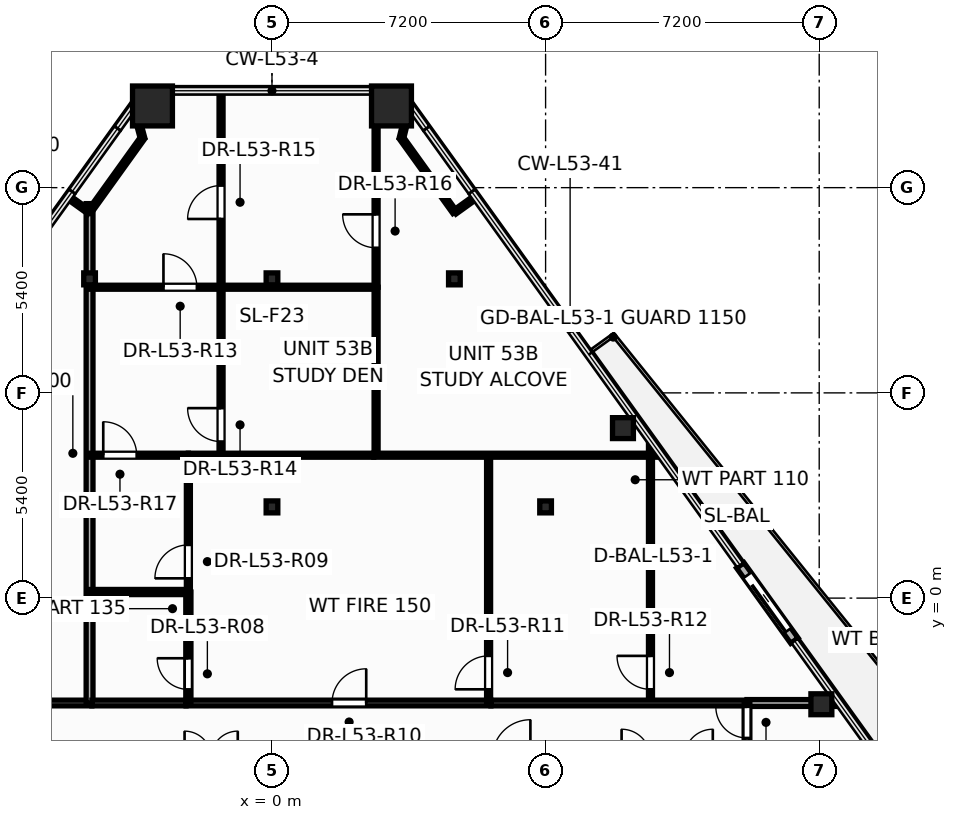
"""IFC4 building model, lengths in metres.
Left out: names, types, materials, properties, quantities, classifications, styles, units other than length and angle.
Written with IfcOpenShell. Run it as: python <this file> out.ifc"""

import sys

from ifc_helpers import new_model, si_unit, direction, frame, frame_2d, origin, origin_2d, place, context, subcontext, project, spatial, rectangle, hollow_rectangle, hollow_circle, i_section, extrude, element, fill, save


model = new_model("IFC4")
c1 = context("Model", 3, precision=1e-05, world=origin(), true_north=direction((0.0, 1.0)))
c2 = subcontext(c1, "Body", "Model", "MODEL_VIEW")
j1 = project(units=[si_unit("LENGTHUNIT", "METRE"), si_unit("PLANEANGLEUNIT", "RADIAN")], contexts=[c1])
p1 = place(None, origin())
s1 = spatial("IfcSite", under=j1, at=p1, CompositionType="ELEMENT")
p2 = place(p1, origin())
s2 = spatial("IfcBuilding", under=s1, at=p2, CompositionType="ELEMENT")
p3 = place(p2, frame((0.0, 0.0, 203.7)))
s3 = spatial("IfcBuildingStorey", under=s2, at=p3, CompositionType="ELEMENT", Elevation=203.7)
for number, where, z_axis, x_axis in (
    (1, (3.145, 12.95, 0.0), (0.0, 0.0, 1.0), (1.0, 0.0, 0.0)),
    (2, (-3.145, 12.95, 0.0), (0.0, 0.0, 1.0), (1.0, 0.0, 0.0)),
):
    element("IfcColumn", number, at=place(p3, frame(where, z_axis=z_axis, x_axis=x_axis)), inside=s3, PredefinedType="COLUMN", context=c2, shape_type="SweptSolid", body=[
        extrude(hollow_rectangle(XDim=1.05, YDim=1.05, WallThickness=0.045, at=origin_2d()), origin(), (0.0, 0.0, 1.0), 3.6),
    ])
for number, where, z_axis, x_axis in (
    (3, (14.457, -2.793, 0.0), (0.0, 0.0, 1.0), (1.0, 0.0, 0.0)),
    (4, (9.236, 4.473, 0.0), (0.0, 0.0, 1.0), (1.0, 0.0, 0.0)),
):
    element("IfcColumn", number, at=place(p3, frame(where, z_axis=z_axis, x_axis=x_axis)), inside=s3, PredefinedType="COLUMN", context=c2, shape_type="SweptSolid", body=[
        extrude(hollow_circle(Radius=0.275, WallThickness=0.024, at=origin_2d()), origin(), (0.0, 0.0, 1.0), 3.6),
    ])
for number, where, z_axis, x_axis in (
    (5, (0.0, 2.4, 0.0), (0.0, 0.0, 1.0), (1.0, 0.0, 0.0)),
    (6, (7.2, 2.4, 0.0), (0.0, 0.0, 1.0), (1.0, 0.0, 0.0)),
    (7, (-4.8, 8.4, 0.0), (0.0, 0.0, 1.0), (1.0, 0.0, 0.0)),
    (8, (0.0, 8.4, 0.0), (0.0, 0.0, 1.0), (1.0, 0.0, 0.0)),
    (9, (4.8, 8.4, 0.0), (0.0, 0.0, 1.0), (1.0, 0.0, 0.0)),
):
    element("IfcColumn", number, at=place(p3, frame(where, z_axis=z_axis, x_axis=x_axis)), inside=s3, PredefinedType="COLUMN", context=c2, shape_type="SweptSolid", body=[
        extrude(i_section(OverallWidth=0.307, OverallDepth=0.314, WebThickness=0.012, FlangeThickness=0.019, at=origin_2d()), origin(), (0.0, 0.0, 1.0), 3.6),
    ])
p4 = place(p3, frame((13.747, -1.12, -0.015), z_axis=(0.0, 0.0, 1.0), x_axis=(-0.58349791381, 0.812114637585, 0.0)))
e10 = element("IfcWall", 10, at=p4, inside=s3, PredefinedType="STANDARD", context=c2, shape_type="SweptSolid", body=[
    extrude(rectangle(XDim=2.44, YDim=0.24, at=frame_2d((1.22, 0.0))), origin(), (0.0, 0.0, 1.0), 2.802),
])
p5 = place(p4, frame((0.32, 0.0, 0.015)))
e11 = element("IfcOpeningElement", 11, at=p5, cuts=e10, PredefinedType="OPENING", context=c2, shape_type="SweptSolid", body=[
    extrude(rectangle(XDim=1.806, YDim=2.204, at=frame_2d((0.9, 1.102))), frame((0.0, 0.13, 0.0), z_axis=(0.0, -1.0, 0.0), x_axis=(1.0, 0.0, 0.0)), (0.0, 0.0, 1.0), 0.26),
])
p6 = place(p3, frame((-2.26, -2.76, 0.0), z_axis=(0.0, 0.0, 1.0), x_axis=(1.0, 0.0, 0.0)))
e12 = element("IfcWall", 12, at=p6, inside=s3, PredefinedType="PARTITIONING", context=c2, shape_type="SweptSolid", body=[
    extrude(rectangle(XDim=8.02, YDim=0.15, at=frame_2d((4.01, 0.0))), origin(), (0.0, 0.0, 1.0), 2.32),
])
p7 = place(p6, frame((3.84, 0.0, 0.0)))
e13 = element("IfcOpeningElement", 13, at=p7, cuts=e12, PredefinedType="OPENING", context=c2, shape_type="SweptSolid", body=[
    extrude(rectangle(XDim=0.906, YDim=2.104, at=frame_2d((0.45, 1.052))), frame((0.0, 0.085, 0.0), z_axis=(0.0, -1.0, 0.0), x_axis=(1.0, 0.0, 0.0)), (0.0, 0.0, 1.0), 0.17),
])
p8 = place(p3, frame((-12.5, -2.76, 0.0), z_axis=(0.0, 0.0, 1.0), x_axis=(1.0, 0.0, 0.0)))
e14 = element("IfcWall", 14, at=p8, inside=s3, PredefinedType="PARTITIONING", context=c2, shape_type="SweptSolid", body=[
    extrude(rectangle(XDim=7.76, YDim=0.15, at=frame_2d((3.88, 0.0))), origin(), (0.0, 0.0, 1.0), 2.32),
])
p9 = place(p8, frame((1.675, 0.0, 0.0)))
e15 = element("IfcOpeningElement", 15, at=p9, cuts=e14, PredefinedType="OPENING", context=c2, shape_type="SweptSolid", body=[
    extrude(rectangle(XDim=0.906, YDim=2.104, at=frame_2d((0.45, 1.052))), frame((0.0, 0.085, 0.0), z_axis=(0.0, -1.0, 0.0), x_axis=(1.0, 0.0, 0.0)), (0.0, 0.0, 1.0), 0.17),
])
p10 = place(p3, frame((9.96, -2.76, 0.0), z_axis=(0.0, 0.0, 1.0), x_axis=(0.0, 1.0, 0.0)))
e16 = element("IfcWall", 16, at=p10, inside=s3, PredefinedType="PARTITIONING", context=c2, shape_type="SweptSolid", body=[
    extrude(rectangle(XDim=6.911, YDim=0.105, at=frame_2d((3.455, 0.0))), origin(), (0.0, 0.0, 1.0), 2.62),
])
p11 = place(p10, frame((0.36, 0.0, 0.0)))
e17 = element("IfcOpeningElement", 17, at=p11, cuts=e16, PredefinedType="OPENING", context=c2, shape_type="SweptSolid", body=[
    extrude(rectangle(XDim=0.886, YDim=2.104, at=frame_2d((0.44, 1.052))), frame((0.0, 0.062, 0.0), z_axis=(0.0, -1.0, 0.0), x_axis=(1.0, 0.0, 0.0)), (0.0, 0.0, 1.0), 0.125),
])
p12 = place(p3, frame((5.7, -2.76, 0.0), z_axis=(0.0, 0.0, 1.0), x_axis=(0.0, 1.0, 0.0)))
e18 = element("IfcWall", 18, at=p12, inside=s3, PredefinedType="PARTITIONING", context=c2, shape_type="SweptSolid", body=[
    extrude(rectangle(XDim=6.52, YDim=0.105, at=frame_2d((3.26, 0.0))), origin(), (0.0, 0.0, 1.0), 2.32),
])
p13 = place(p12, frame((0.36, 0.0, 0.0)))
e19 = element("IfcOpeningElement", 19, at=p13, cuts=e18, PredefinedType="OPENING", context=c2, shape_type="SweptSolid", body=[
    extrude(rectangle(XDim=0.886, YDim=2.104, at=frame_2d((0.44, 1.052))), frame((0.0, 0.062, 0.0), z_axis=(0.0, -1.0, 0.0), x_axis=(1.0, 0.0, 0.0)), (0.0, 0.0, 1.0), 0.125),
])
p14 = place(p3, frame((-1.34, 8.18, 0.0), z_axis=(0.0, 0.0, 1.0), x_axis=(0.0, 1.0, 0.0)))
e20 = element("IfcWall", 20, at=p14, inside=s3, PredefinedType="PARTITIONING", context=c2, shape_type="SweptSolid", body=[
    extrude(rectangle(XDim=5.17, YDim=0.105, at=frame_2d((2.585, 0.0))), origin(), (0.0, 0.0, 1.0), 2.62),
])
p15 = place(p14, frame((1.796, 0.0, 0.0)))
e21 = element("IfcOpeningElement", 21, at=p15, cuts=e20, PredefinedType="OPENING", context=c2, shape_type="SweptSolid", body=[
    extrude(rectangle(XDim=0.886, YDim=2.104, at=frame_2d((0.44, 1.052))), frame((0.0, 0.062, 0.0), z_axis=(0.0, -1.0, 0.0), x_axis=(1.0, 0.0, 0.0)), (0.0, 0.0, 1.0), 0.125),
])
p16 = place(p3, frame((2.74, 8.18, 0.0), z_axis=(0.0, 0.0, 1.0), x_axis=(0.0, 1.0, 0.0)))
e22 = element("IfcWall", 22, at=p16, inside=s3, PredefinedType="PARTITIONING", context=c2, shape_type="SweptSolid", body=[
    extrude(rectangle(XDim=5.17, YDim=0.105, at=frame_2d((2.585, 0.0))), origin(), (0.0, 0.0, 1.0), 2.62),
])
p17 = place(p16, frame((1.038, 0.0, 0.0)))
e23 = element("IfcOpeningElement", 23, at=p17, cuts=e22, PredefinedType="OPENING", context=c2, shape_type="SweptSolid", body=[
    extrude(rectangle(XDim=0.886, YDim=2.104, at=frame_2d((0.44, 1.052))), frame((0.0, 0.062, 0.0), z_axis=(0.0, -1.0, 0.0), x_axis=(1.0, 0.0, 0.0)), (0.0, 0.0, 1.0), 0.125),
])
p18 = place(p3, frame((-4.8, -2.76, 0.0), z_axis=(0.0, 0.0, 1.0), x_axis=(0.0, 1.0, 0.0)))
e24 = element("IfcWall", 24, at=p18, inside=s3, PredefinedType="PARTITIONING", context=c2, shape_type="SweptSolid", body=[
    extrude(rectangle(XDim=13.14, YDim=0.18, at=frame_2d((6.57, 0.0))), origin(), (0.0, 0.0, 1.0), 2.32),
])
p19 = place(p3, frame((2.68, 3.76, 0.0), z_axis=(0.0, 0.0, 1.0), x_axis=(1.0, 0.0, 0.0)))
e25 = element("IfcWall", 25, at=p19, inside=s3, PredefinedType="PARTITIONING", context=c2, shape_type="SweptSolid", body=[
    extrude(rectangle(XDim=7.561, YDim=0.105, at=frame_2d((3.78, 0.0))), origin(), (0.0, 0.0, 1.0), 2.62),
])
p20 = place(p3, frame((-1.34, 3.76, 0.0), z_axis=(0.0, 0.0, 1.0), x_axis=(0.0, 1.0, 0.0)))
e26 = element("IfcWall", 26, at=p20, inside=s3, PredefinedType="PARTITIONING", context=c2, shape_type="SweptSolid", body=[
    extrude(rectangle(XDim=4.42, YDim=0.105, at=frame_2d((2.21, 0.0))), origin(), (0.0, 0.0, 1.0), 3.345),
])
p21 = place(p20, frame((0.359, 0.0, 0.0)))
e27 = element("IfcOpeningElement", 27, at=p21, cuts=e26, PredefinedType="OPENING", context=c2, shape_type="SweptSolid", body=[
    extrude(rectangle(XDim=0.886, YDim=2.104, at=frame_2d((0.44, 1.052))), frame((0.0, 0.062, 0.0), z_axis=(0.0, -1.0, 0.0), x_axis=(1.0, 0.0, 0.0)), (0.0, 0.0, 1.0), 0.125),
])
p22 = place(p3, frame((2.74, 3.76, 0.0), z_axis=(0.0, 0.0, 1.0), x_axis=(0.0, 1.0, 0.0)))
e28 = element("IfcWall", 28, at=p22, inside=s3, PredefinedType="PARTITIONING", context=c2, shape_type="SweptSolid", body=[
    extrude(rectangle(XDim=4.42, YDim=0.105, at=frame_2d((2.21, 0.0))), origin(), (0.0, 0.0, 1.0), 3.345),
])
p23 = place(p3, frame((5.762, -2.76, 0.0), z_axis=(0.0, 0.0, 1.0), x_axis=(1.0, 0.0, 0.0)))
e29 = element("IfcWall", 29, at=p23, inside=s3, PredefinedType="PARTITIONING", context=c2, shape_type="SweptSolid", body=[
    extrude(rectangle(XDim=6.738, YDim=0.15, at=frame_2d((3.369, 0.0))), origin(), (0.0, 0.0, 1.0), 2.32),
])
p24 = place(p3, frame((-2.2, 3.76, 0.0), z_axis=(0.0, 0.0, 1.0), x_axis=(1.0, 0.0, 0.0)))
e30 = element("IfcWall", 30, at=p24, inside=s3, PredefinedType="PARTITIONING", context=c2, shape_type="SweptSolid", body=[
    extrude(rectangle(XDim=4.878, YDim=0.105, at=frame_2d((2.439, 0.0))), origin(), (0.0, 0.0, 1.0), 2.32),
])
p25 = place(p3, frame((-1.34, 8.18, 0.0), z_axis=(0.0, 0.0, 1.0), x_axis=(1.0, 0.0, 0.0)))
e31 = element("IfcWall", 31, at=p25, inside=s3, PredefinedType="PARTITIONING", context=c2, shape_type="SweptSolid", body=[
    extrude(rectangle(XDim=4.08, YDim=0.105, at=frame_2d((2.04, 0.0))), origin(), (0.0, 0.0, 1.0), 2.32),
])
p26 = place(p3, frame((-2.2, 0.16, 0.0), z_axis=(0.0, 0.0, 1.0), x_axis=(0.0, 1.0, 0.0)))
e32 = element("IfcWall", 32, at=p26, inside=s3, PredefinedType="PARTITIONING", context=c2, shape_type="SweptSolid", body=[
    extrude(rectangle(XDim=3.6, YDim=0.105, at=frame_2d((1.8, 0.0))), origin(), (0.0, 0.0, 1.0), 2.32),
])
p27 = place(p26, frame((0.36, 0.0, 0.0)))
e33 = element("IfcOpeningElement", 33, at=p27, cuts=e32, PredefinedType="OPENING", context=c2, shape_type="SweptSolid", body=[
    extrude(rectangle(XDim=0.886, YDim=2.104, at=frame_2d((0.44, 1.052))), frame((0.0, 0.062, 0.0), z_axis=(0.0, -1.0, 0.0), x_axis=(1.0, 0.0, 0.0)), (0.0, 0.0, 1.0), 0.125),
])
p28 = place(p3, frame((-4.8, 8.18, 0.0), z_axis=(0.0, 0.0, 1.0), x_axis=(1.0, 0.0, 0.0)))
e34 = element("IfcWall", 34, at=p28, inside=s3, PredefinedType="PARTITIONING", context=c2, shape_type="SweptSolid", body=[
    extrude(rectangle(XDim=3.46, YDim=0.105, at=frame_2d((1.73, 0.0))), origin(), (0.0, 0.0, 1.0), 2.62),
])
p29 = place(p28, frame((1.944, 0.0, 0.0)))
e35 = element("IfcOpeningElement", 35, at=p29, cuts=e34, PredefinedType="OPENING", context=c2, shape_type="SweptSolid", body=[
    extrude(rectangle(XDim=0.886, YDim=2.104, at=frame_2d((0.44, 1.052))), frame((0.0, 0.062, 0.0), z_axis=(0.0, -1.0, 0.0), x_axis=(1.0, 0.0, 0.0)), (0.0, 0.0, 1.0), 0.125),
])
p30 = place(p3, frame((-2.2, -2.76, 0.0), z_axis=(0.0, 0.0, 1.0), x_axis=(0.0, 1.0, 0.0)))
e36 = element("IfcWall", 36, at=p30, inside=s3, PredefinedType="PARTITIONING", context=c2, shape_type="SweptSolid", body=[
    extrude(rectangle(XDim=2.92, YDim=0.135, at=frame_2d((1.46, 0.0))), origin(), (0.0, 0.0, 1.0), 3.345),
])
p31 = place(p30, frame((0.357, 0.0, 0.0)))
e37 = element("IfcOpeningElement", 37, at=p31, cuts=e36, PredefinedType="OPENING", context=c2, shape_type="SweptSolid", body=[
    extrude(rectangle(XDim=0.826, YDim=2.104, at=frame_2d((0.41, 1.052))), frame((0.0, 0.078, 0.0), z_axis=(0.0, -1.0, 0.0), x_axis=(1.0, 0.0, 0.0)), (0.0, 0.0, 1.0), 0.155),
])
p32 = place(p3, frame((-4.738, -2.76, 0.0), z_axis=(0.0, 0.0, 1.0), x_axis=(1.0, 0.0, 0.0)))
e38 = element("IfcWall", 38, at=p32, inside=s3, PredefinedType="PARTITIONING", context=c2, shape_type="SweptSolid", body=[
    extrude(rectangle(XDim=2.476, YDim=0.15, at=frame_2d((1.238, 0.0))), origin(), (0.0, 0.0, 1.0), 2.964),
])
p33 = place(p3, frame((-4.8, 0.16, 0.0), z_axis=(0.0, 0.0, 1.0), x_axis=(1.0, 0.0, 0.0)))
e39 = element("IfcWall", 39, at=p33, inside=s3, PredefinedType="PARTITIONING", context=c2, shape_type="SweptSolid", body=[
    extrude(rectangle(XDim=2.6, YDim=0.135, at=frame_2d((1.3, 0.0))), origin(), (0.0, 0.0, 1.0), 2.964),
])
p34 = place(p3, frame((-4.8, 3.76, 0.0), z_axis=(0.0, 0.0, 1.0), x_axis=(1.0, 0.0, 0.0)))
e40 = element("IfcWall", 40, at=p34, inside=s3, PredefinedType="PARTITIONING", context=c2, shape_type="SweptSolid", body=[
    extrude(rectangle(XDim=2.6, YDim=0.105, at=frame_2d((1.3, 0.0))), origin(), (0.0, 0.0, 1.0), 2.964),
])
p35 = place(p34, frame((0.36, 0.0, 0.0)))
e41 = element("IfcOpeningElement", 41, at=p35, cuts=e40, PredefinedType="OPENING", context=c2, shape_type="SweptSolid", body=[
    extrude(rectangle(XDim=0.886, YDim=2.104, at=frame_2d((0.44, 1.052))), frame((0.0, 0.062, 0.0), z_axis=(0.0, -1.0, 0.0), x_axis=(1.0, 0.0, 0.0)), (0.0, 0.0, 1.0), 0.125),
])
p36 = place(p3, frame((12.5, -2.76, 0.0), z_axis=(0.0, 0.0, 1.0), x_axis=(1.0, 0.0, 0.0)))
e42 = element("IfcWall", 42, at=p36, inside=s3, PredefinedType="PARTITIONING", context=c2, shape_type="SweptSolid", body=[
    extrude(rectangle(XDim=2.426, YDim=0.18, at=frame_2d((1.213, 0.0))), origin(), (0.0, 0.0, 1.0), 2.62),
])
for number, where, z_axis, x_axis in (
    (43, (-3.407, 12.104, 0.0), (0.0, 0.0, 1.0), (-0.584, -0.812, 0.0)),
    (44, (4.808, 10.155, 0.0), (0.0, 0.0, 1.0), (-0.584, 0.812, 0.0)),
):
    element("IfcWall", number, at=place(p3, frame(where, z_axis=z_axis, x_axis=x_axis)), inside=s3, PredefinedType="PARTITIONING", context=c2, shape_type="SweptSolid", body=[
        extrude(rectangle(XDim=2.4, YDim=0.12, at=frame_2d((1.2, 0.0))), origin(), (0.0, 0.0, 1.0), 2.62),
    ])
p37 = place(p3, frame((12.5, -4.24, 0.0), z_axis=(0.0, 0.0, 1.0), x_axis=(0.0, 1.0, 0.0)))
e45 = element("IfcWall", 45, at=p37, inside=s3, PredefinedType="PARTITIONING", context=c2, shape_type="SweptSolid", body=[
    extrude(rectangle(XDim=1.48, YDim=0.15, at=frame_2d((0.74, 0.0))), origin(), (0.0, 0.0, 1.0), 2.32),
])
p38 = place(p37, frame((0.56, 0.0, 0.0)))
e46 = element("IfcOpeningElement", 46, at=p38, cuts=e45, PredefinedType="OPENING", context=c2, shape_type="SweptSolid", body=[
    extrude(rectangle(XDim=0.826, YDim=2.104, at=frame_2d((0.41, 1.052))), frame((0.0, 0.085, 0.0), z_axis=(0.0, -1.0, 0.0), x_axis=(1.0, 0.0, 0.0)), (0.0, 0.0, 1.0), 0.17),
])
p39 = place(p3, frame((-3.63, 12.942, 0.0), z_axis=(0.0, 0.0, 1.0), x_axis=(0.256751374208, -0.966477486464, 0.0)))
e47 = element("IfcWall", 47, at=p39, inside=s3, PredefinedType="PARTITIONING", context=c2, shape_type="SweptSolid", body=[
    extrude(rectangle(XDim=0.867, YDim=0.12, at=frame_2d((0.434, 0.0))), origin(), (0.0, 0.0, 1.0), 2.62),
])
p40 = place(p3, frame((3.407, 12.104, 0.0), z_axis=(0.0, 0.0, 1.0), x_axis=(0.237718936872, 0.971333983269, 0.0)))
e48 = element("IfcWall", 48, at=p40, inside=s3, PredefinedType="PARTITIONING", context=c2, shape_type="SweptSolid", body=[
    extrude(rectangle(XDim=0.847, YDim=0.12, at=frame_2d((0.424, 0.0))), origin(), (0.0, 0.0, 1.0), 2.62),
])
for number, where, z_axis, x_axis in (
    (49, (-4.808, 10.155, 0.0), (0.0, 0.0, 1.0), (-0.812, 0.584, 0.0)),
    (50, (5.352, 10.546, 0.0), (0.0, 0.0, 1.0), (-0.812, -0.584, 0.0)),
):
    element("IfcWall", number, at=place(p3, frame(where, z_axis=z_axis, x_axis=x_axis)), inside=s3, PredefinedType="PARTITIONING", context=c2, shape_type="SweptSolid", body=[
        extrude(rectangle(XDim=0.67, YDim=0.12, at=frame_2d((0.335, 0.0))), origin(), (0.0, 0.0, 1.0), 2.787),
    ])
p41 = place(p5, origin())
e51 = element("IfcDoor", 51, at=p41, inside=s3, OperationType="SLIDING_TO_LEFT", PredefinedType="DOOR", context=c2, shape_type="SweptSolid", body=[
    extrude(rectangle(XDim=1.8, YDim=2.2, at=frame_2d((0.9, 1.1))), frame((0.0, 0.025, 0.0), z_axis=(0.0, -1.0, 0.0), x_axis=(1.0, 0.0, 0.0)), (0.0, 0.0, 1.0), 0.05),
])
fill(e11, e51)
p42 = place(p38, origin())
e52 = element("IfcDoor", 52, at=p42, inside=s3, OperationType="SINGLE_SWING_RIGHT", PredefinedType="DOOR", context=c2, shape_type="SweptSolid", body=[
    extrude(rectangle(XDim=0.82, YDim=2.1, at=frame_2d((0.41, 1.05))), frame((0.0, 0.025, 0.0), z_axis=(0.0, -1.0, 0.0), x_axis=(1.0, 0.0, 0.0)), (0.0, 0.0, 1.0), 0.05),
])
fill(e46, e52)
p43 = place(p31, origin())
e53 = element("IfcDoor", 53, at=p43, inside=s3, OperationType="SINGLE_SWING_RIGHT", PredefinedType="DOOR", context=c2, shape_type="SweptSolid", body=[
    extrude(rectangle(XDim=0.82, YDim=2.1, at=frame_2d((0.41, 1.05))), frame((0.0, 0.025, 0.0), z_axis=(0.0, -1.0, 0.0), x_axis=(1.0, 0.0, 0.0)), (0.0, 0.0, 1.0), 0.05),
])
fill(e37, e53)
p44 = place(p27, origin())
e54 = element("IfcDoor", 54, at=p44, inside=s3, OperationType="SINGLE_SWING_LEFT", PredefinedType="DOOR", context=c2, shape_type="SweptSolid", body=[
    extrude(rectangle(XDim=0.88, YDim=2.1, at=frame_2d((0.44, 1.05))), frame((0.0, 0.025, 0.0), z_axis=(0.0, -1.0, 0.0), x_axis=(1.0, 0.0, 0.0)), (0.0, 0.0, 1.0), 0.05),
])
fill(e33, e54)
p45 = place(p7, origin())
e55 = element("IfcDoor", 55, at=p45, inside=s3, OperationType="SINGLE_SWING_RIGHT", PredefinedType="DOOR", context=c2, shape_type="SweptSolid", body=[
    extrude(rectangle(XDim=0.9, YDim=2.1, at=frame_2d((0.45, 1.05))), frame((0.0, 0.025, 0.0), z_axis=(0.0, -1.0, 0.0), x_axis=(1.0, 0.0, 0.0)), (0.0, 0.0, 1.0), 0.05),
])
fill(e13, e55)
p46 = place(p13, origin())
e56 = element("IfcDoor", 56, at=p46, inside=s3, OperationType="SINGLE_SWING_LEFT", PredefinedType="DOOR", context=c2, shape_type="SweptSolid", body=[
    extrude(rectangle(XDim=0.88, YDim=2.1, at=frame_2d((0.44, 1.05))), frame((0.0, 0.025, 0.0), z_axis=(0.0, -1.0, 0.0), x_axis=(1.0, 0.0, 0.0)), (0.0, 0.0, 1.0), 0.05),
])
fill(e19, e56)
p47 = place(p11, origin())
e57 = element("IfcDoor", 57, at=p47, inside=s3, OperationType="SINGLE_SWING_RIGHT", PredefinedType="DOOR", context=c2, shape_type="SweptSolid", body=[
    extrude(rectangle(XDim=0.88, YDim=2.1, at=frame_2d((0.44, 1.05))), frame((0.0, 0.025, 0.0), z_axis=(0.0, -1.0, 0.0), x_axis=(1.0, 0.0, 0.0)), (0.0, 0.0, 1.0), 0.05),
])
fill(e17, e57)
p48 = place(p29, origin())
e58 = element("IfcDoor", 58, at=p48, inside=s3, OperationType="SINGLE_SWING_LEFT", PredefinedType="DOOR", context=c2, shape_type="SweptSolid", body=[
    extrude(rectangle(XDim=0.88, YDim=2.1, at=frame_2d((0.44, 1.05))), frame((0.0, 0.025, 0.0), z_axis=(0.0, -1.0, 0.0), x_axis=(1.0, 0.0, 0.0)), (0.0, 0.0, 1.0), 0.05),
])
fill(e35, e58)
p49 = place(p21, origin())
e59 = element("IfcDoor", 59, at=p49, inside=s3, OperationType="SINGLE_SWING_RIGHT", PredefinedType="DOOR", context=c2, shape_type="SweptSolid", body=[
    extrude(rectangle(XDim=0.88, YDim=2.1, at=frame_2d((0.44, 1.05))), frame((0.0, 0.025, 0.0), z_axis=(0.0, -1.0, 0.0), x_axis=(1.0, 0.0, 0.0)), (0.0, 0.0, 1.0), 0.05),
])
fill(e27, e59)
p50 = place(p15, origin())
e60 = element("IfcDoor", 60, at=p50, inside=s3, OperationType="SINGLE_SWING_LEFT", PredefinedType="DOOR", context=c2, shape_type="SweptSolid", body=[
    extrude(rectangle(XDim=0.88, YDim=2.1, at=frame_2d((0.44, 1.05))), frame((0.0, 0.025, 0.0), z_axis=(0.0, -1.0, 0.0), x_axis=(1.0, 0.0, 0.0)), (0.0, 0.0, 1.0), 0.05),
])
fill(e21, e60)
p51 = place(p17, origin())
e61 = element("IfcDoor", 61, at=p51, inside=s3, OperationType="SINGLE_SWING_RIGHT", PredefinedType="DOOR", context=c2, shape_type="SweptSolid", body=[
    extrude(rectangle(XDim=0.88, YDim=2.1, at=frame_2d((0.44, 1.05))), frame((0.0, 0.025, 0.0), z_axis=(0.0, -1.0, 0.0), x_axis=(1.0, 0.0, 0.0)), (0.0, 0.0, 1.0), 0.05),
])
fill(e23, e61)
p52 = place(p35, origin())
e62 = element("IfcDoor", 62, at=p52, inside=s3, OperationType="SINGLE_SWING_LEFT", PredefinedType="DOOR", context=c2, shape_type="SweptSolid", body=[
    extrude(rectangle(XDim=0.88, YDim=2.1, at=frame_2d((0.44, 1.05))), frame((0.0, 0.025, 0.0), z_axis=(0.0, -1.0, 0.0), x_axis=(1.0, 0.0, 0.0)), (0.0, 0.0, 1.0), 0.05),
])
fill(e41, e62)
save(model, sys.argv[1])
